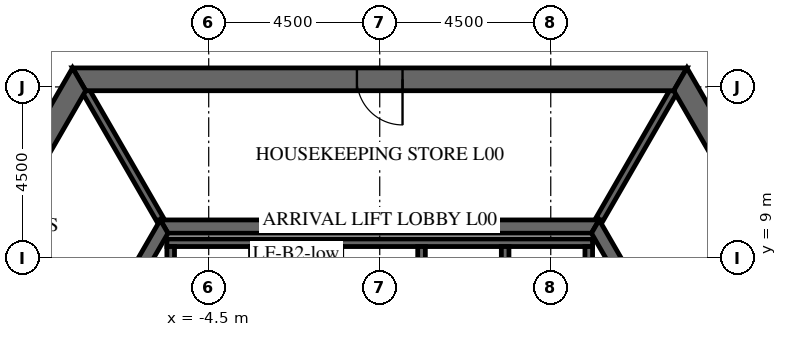
"""IFC4 building model, lengths in metres.
Left out: names, types, materials, properties, quantities, classifications, styles, units other than length and angle.
Written with IfcOpenShell. Run it as: python <this file> out.ifc"""

import sys

from ifc_helpers import new_model, si_unit, direction, frame, frame_2d, origin, place, context, subcontext, project, spatial, polyline, rectangle, outline, extrude, element, fill, save


model = new_model("IFC4")
c1 = context("Model", 3, precision=1e-05, world=origin(), true_north=direction((0.0, 1.0)))
c2 = subcontext(c1, "Body", "Model", "MODEL_VIEW")
j1 = project(units=[si_unit("LENGTHUNIT", "METRE"), si_unit("PLANEANGLEUNIT", "RADIAN")], contexts=[c1])
p1 = place(None, origin())
s1 = spatial("IfcSite", under=j1, at=p1, CompositionType="ELEMENT")
p2 = place(p1, origin())
s2 = spatial("IfcBuilding", under=s1, at=p2, CompositionType="ELEMENT")
p3 = place(p2, origin())
s3 = spatial("IfcBuildingStorey", under=s2, at=p3, CompositionType="ELEMENT", Elevation=0.0)
p4 = place(p3, frame((-7.91, 13.7, -2.1), z_axis=(0.0, 0.0, 1.0), x_axis=(-0.499999880136, -0.866025472988, 0.0)))
e1 = element("IfcWall", 1, at=p4, inside=s3, PredefinedType="SHEAR", context=c2, shape_type="SweptSolid", body=[
    extrude(outline(polyline([(-0.173, -0.3), (15.993, -0.3), (15.646, 0.3), (0.173, 0.3), (-0.173, -0.3)])), origin(), (0.0, 0.0, 1.0), 10.85),
])
p5 = place(p4, frame((7.039, 0.0, 2.1)))
e2 = element("IfcOpeningElement", 2, at=p5, cuts=e1, PredefinedType="OPENING", context=c2, shape_type="SweptSolid", body=[
    extrude(rectangle(XDim=1.8, YDim=2.4, at=frame_2d((0.9, 1.2))), frame((0.0, 0.31, 0.0), z_axis=(0.0, -1.0, 0.0), x_axis=(1.0, 0.0, 0.0)), (0.0, 0.0, 1.0), 0.62),
])
p6 = place(p3, frame((15.819, 0.0, -2.1), z_axis=(0.0, 0.0, 1.0), x_axis=(-0.499999880136, 0.866025472988, 0.0)))
e3 = element("IfcWall", 3, at=p6, inside=s3, PredefinedType="SHEAR", context=c2, shape_type="SweptSolid", body=[
    extrude(outline(polyline([(-0.173, -0.3), (15.993, -0.3), (15.646, 0.3), (0.173, 0.3), (-0.173, -0.3)])), origin(), (0.0, 0.0, 1.0), 10.85),
])
p7 = place(p6, frame((6.981, 0.0, 2.1)))
e4 = element("IfcOpeningElement", 4, at=p7, cuts=e3, PredefinedType="OPENING", context=c2, shape_type="SweptSolid", body=[
    extrude(rectangle(XDim=1.8, YDim=2.4, at=frame_2d((0.9, 1.2))), frame((0.0, 0.31, 0.0), z_axis=(0.0, -1.0, 0.0), x_axis=(1.0, 0.0, 0.0)), (0.0, 0.0, 1.0), 0.62),
])
p8 = place(p3, frame((7.91, 13.7, -2.1), z_axis=(0.0, 0.0, 1.0), x_axis=(-1.0, 0.0, 0.0)))
e5 = element("IfcWall", 5, at=p8, inside=s3, PredefinedType="SHEAR", context=c2, shape_type="SweptSolid", body=[
    extrude(outline(polyline([(-0.173, -0.3), (15.993, -0.3), (15.646, 0.3), (0.173, 0.3), (-0.173, -0.3)])), origin(), (0.0, 0.0, 1.0), 10.85),
])
p9 = place(p8, frame((7.31, 0.0, 2.1)))
e6 = element("IfcOpeningElement", 6, at=p9, cuts=e5, PredefinedType="OPENING", context=c2, shape_type="SweptSolid", body=[
    extrude(rectangle(XDim=1.2, YDim=2.4, at=frame_2d((0.6, 1.2))), frame((0.0, 0.31, 0.0), z_axis=(0.0, -1.0, 0.0), x_axis=(1.0, 0.0, 0.0)), (0.0, 0.0, 1.0), 0.62),
])
p10 = place(p3, frame((-5.673, 9.825, -2.1), z_axis=(0.0, 0.0, 1.0), x_axis=(-0.499995046907, -0.866028263435, 0.0)))
e7 = element("IfcWall", 7, at=p10, inside=s3, PredefinedType="SHEAR", context=c2, shape_type="SweptSolid", body=[
    extrude(outline(polyline([(-0.101, -0.175), (11.446, -0.175), (11.244, 0.175), (0.101, 0.175), (-0.101, -0.175)])), origin(), (0.0, 0.0, 1.0), 10.85),
])
p11 = place(p10, frame((4.801, 0.0, 2.1)))
e8 = element("IfcOpeningElement", 8, at=p11, cuts=e7, PredefinedType="OPENING", context=c2, shape_type="SweptSolid", body=[
    extrude(rectangle(XDim=1.8, YDim=2.4, at=frame_2d((0.9, 1.2))), frame((0.0, 0.185, 0.0), z_axis=(0.0, -1.0, 0.0), x_axis=(1.0, 0.0, 0.0)), (0.0, 0.0, 1.0), 0.37),
])
p12 = place(p3, frame((11.345, 0.0, -2.1), z_axis=(0.0, 0.0, 1.0), x_axis=(-0.499995046907, 0.866028263435, 0.0)))
e9 = element("IfcWall", 9, at=p12, inside=s3, PredefinedType="SHEAR", context=c2, shape_type="SweptSolid", body=[
    extrude(outline(polyline([(-0.101, -0.175), (11.446, -0.175), (11.244, 0.175), (0.101, 0.175), (-0.101, -0.175)])), origin(), (0.0, 0.0, 1.0), 10.85),
])
p13 = place(p12, frame((4.744, 0.0, 2.1)))
e10 = element("IfcOpeningElement", 10, at=p13, cuts=e9, PredefinedType="OPENING", context=c2, shape_type="SweptSolid", body=[
    extrude(rectangle(XDim=1.8, YDim=2.4, at=frame_2d((0.9, 1.2))), frame((0.0, 0.185, 0.0), z_axis=(0.0, -1.0, 0.0), x_axis=(1.0, 0.0, 0.0)), (0.0, 0.0, 1.0), 0.37),
])
p14 = place(p3, frame((5.673, 9.825, -2.1), z_axis=(0.0, 0.0, 1.0), x_axis=(-1.0, 0.0, 0.0)))
e11 = element("IfcWall", 11, at=p14, inside=s3, PredefinedType="SHEAR", context=c2, shape_type="SweptSolid", body=[
    extrude(outline(polyline([(-0.101, -0.175), (11.446, -0.175), (11.244, 0.175), (0.101, 0.175), (-0.101, -0.175)])), origin(), (0.0, 0.0, 1.0), 10.85),
])
p15 = place(p3, frame((-5.6, 9.4, -2.1), z_axis=(0.0, 0.0, 1.0), x_axis=(1.0, 0.0, 0.0)))
e12 = element("IfcWall", 12, at=p15, inside=s3, PredefinedType="SHEAR", context=c2, shape_type="SweptSolid", body=[
    extrude(rectangle(XDim=11.2, YDim=0.2, at=frame_2d((5.6, 0.0))), origin(), (0.0, 0.0, 1.0), 10.85),
])
for number, where, z_axis, x_axis in (
    (13, (-5.5, 6.4, -2.1), (0.0, 0.0, 1.0), (0.0, 1.0, 0.0)),
    (14, (-3.3, 6.4, -2.1), (0.0, 0.0, 1.0), (0.0, 1.0, 0.0)),
    (15, (-1.1, 6.4, -2.1), (0.0, 0.0, 1.0), (0.0, 1.0, 0.0)),
    (16, (1.1, 6.4, -2.1), (0.0, 0.0, 1.0), (0.0, 1.0, 0.0)),
    (17, (3.3, 6.4, -2.1), (0.0, 0.0, 1.0), (0.0, 1.0, 0.0)),
    (18, (5.5, 6.4, -2.1), (0.0, 0.0, 1.0), (0.0, 1.0, 0.0)),
):
    element("IfcWall", number, at=place(p3, frame(where, z_axis=z_axis, x_axis=x_axis)), inside=s3, PredefinedType="SHEAR", context=c2, shape_type="SweptSolid", body=[
        extrude(rectangle(XDim=2.9, YDim=0.2, at=frame_2d((1.45, 0.0))), origin(), (0.0, 0.0, 1.0), 10.85),
    ])
for number, where, z_axis, x_axis in (
    (19, (5.773, 10.0, -2.1), (0.0, 0.0, 1.0), (0.5, 0.866, 0.0)),
    (20, (-5.773, 10.0, -2.1), (0.0, 0.0, 1.0), (-0.5, 0.866, 0.0)),
):
    element("IfcWall", number, at=place(p3, frame(where, z_axis=z_axis, x_axis=x_axis)), inside=s3, PredefinedType="SHEAR", context=c2, shape_type="SweptSolid", body=[
        extrude(rectangle(XDim=3.926, YDim=0.2, at=frame_2d((1.963, 0.0))), origin(), (0.0, 0.0, 1.0), 10.85),
    ])
p16 = place(p9, origin())
e21 = element("IfcDoor", 21, at=p16, inside=s3, OperationType="SINGLE_SWING_LEFT", PredefinedType="DOOR", context=c2, shape_type="SweptSolid", body=[
    extrude(rectangle(XDim=1.2, YDim=2.4, at=frame_2d((0.6, 1.2))), frame((0.0, 0.025, 0.0), z_axis=(0.0, -1.0, 0.0), x_axis=(1.0, 0.0, 0.0)), (0.0, 0.0, 1.0), 0.05),
])
fill(e6, e21)
save(model, sys.argv[1])
